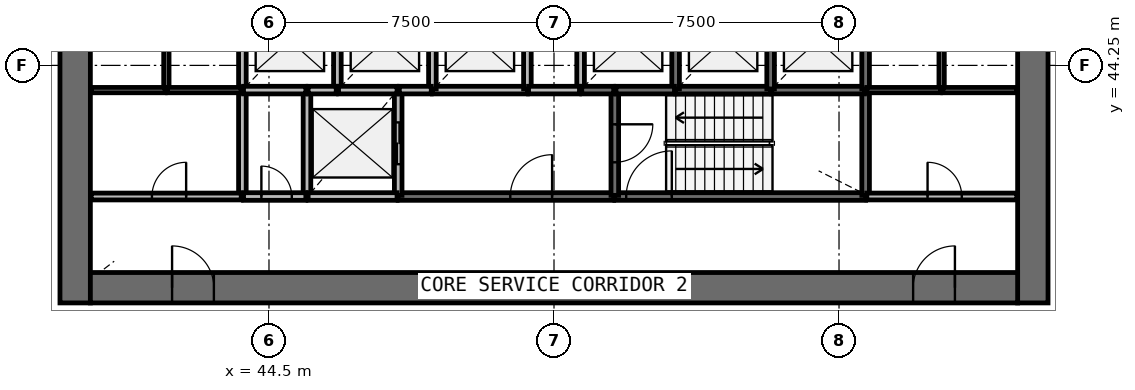
"""IFC4 building model, lengths in metres.
Left out: names, types, materials, properties, quantities, classifications, styles, units other than length and angle.
Written with IfcOpenShell. Run it as: python <this file> out.ifc"""

import sys

from ifc_helpers import new_model, si_unit, direction, frame, frame_2d, origin, place, context, subcontext, project, spatial, rectangle, extrude, source, transform, mapped, element, fill, save


model = new_model("IFC4")
c1 = context("Model", 3, precision=1e-05, world=origin(), true_north=direction((0.0, 1.0)))
c2 = subcontext(c1, "Body", "Model", "MODEL_VIEW")
j1 = project(units=[si_unit("LENGTHUNIT", "METRE"), si_unit("PLANEANGLEUNIT", "RADIAN")], contexts=[c1])
p1 = place(None, origin())
s1 = spatial("IfcSite", under=j1, at=p1, CompositionType="ELEMENT")
p2 = place(p1, origin())
s2 = spatial("IfcBuilding", under=s1, at=p2, CompositionType="ELEMENT")
p3 = place(p2, frame((0.0, 0.0, 133.1)))
s3 = spatial("IfcBuildingStorey", under=s2, at=p3, CompositionType="ELEMENT", Elevation=133.1)
p4 = place(p3, frame((64.6, 38.0, 0.0), z_axis=(0.0, 0.0, 1.0), x_axis=(0.0, 1.0, 0.0)))
e1 = element("IfcWall", 1, at=p4, inside=s3, PredefinedType="SHEAR", context=c2, shape_type="SweptSolid", body=[
    extrude(rectangle(XDim=20.0, YDim=0.8, at=frame_2d((10.0, 0.0))), origin(), (0.0, 0.0, 1.0), 3.9),
])
p5 = place(p4, frame((9.1, 0.0, 0.0)))
e2 = element("IfcOpeningElement", 2, at=p5, cuts=e1, PredefinedType="OPENING", context=c2, shape_type="SweptSolid", body=[
    extrude(rectangle(XDim=1.8, YDim=2.1, at=frame_2d((0.9, 1.05))), frame((0.0, 0.41, 0.0), z_axis=(0.0, -1.0, 0.0), x_axis=(1.0, 0.0, 0.0)), (0.0, 0.0, 1.0), 0.82),
])
p6 = place(p3, frame((39.4, 58.0, 0.0), z_axis=(0.0, 0.0, 1.0), x_axis=(0.0, -1.0, 0.0)))
e3 = element("IfcWall", 3, at=p6, inside=s3, PredefinedType="SHEAR", context=c2, shape_type="SweptSolid", body=[
    extrude(rectangle(XDim=20.0, YDim=0.8, at=frame_2d((10.0, 0.0))), origin(), (0.0, 0.0, 1.0), 3.9),
])
p7 = place(p6, frame((9.1, 0.0, 0.0)))
e4 = element("IfcOpeningElement", 4, at=p7, cuts=e3, PredefinedType="OPENING", context=c2, shape_type="SweptSolid", body=[
    extrude(rectangle(XDim=1.8, YDim=2.1, at=frame_2d((0.9, 1.05))), frame((0.0, 0.41, 0.0), z_axis=(0.0, -1.0, 0.0), x_axis=(1.0, 0.0, 0.0)), (0.0, 0.0, 1.0), 0.82),
])
p8 = place(p3, frame((39.8, 38.4, 0.0), z_axis=(0.0, 0.0, 1.0), x_axis=(1.0, 0.0, 0.0)))
e5 = element("IfcWall", 5, at=p8, inside=s3, PredefinedType="SHEAR", context=c2, shape_type="SweptSolid", body=[
    extrude(rectangle(XDim=24.4, YDim=0.8, at=frame_2d((12.2, 0.0))), origin(), (0.0, 0.0, 1.0), 3.9),
])
p9 = place(p8, frame((21.65, 0.0, 0.0)))
e6 = element("IfcOpeningElement", 6, at=p9, cuts=e5, PredefinedType="OPENING", context=c2, shape_type="SweptSolid", body=[
    extrude(rectangle(XDim=1.1, YDim=2.1, at=frame_2d((0.55, 1.05))), frame((0.0, 0.41, 0.0), z_axis=(0.0, -1.0, 0.0), x_axis=(1.0, 0.0, 0.0)), (0.0, 0.0, 1.0), 0.82),
])
p10 = place(p8, frame((2.15, 0.0, 0.0)))
e7 = element("IfcOpeningElement", 7, at=p10, cuts=e5, PredefinedType="OPENING", context=c2, shape_type="SweptSolid", body=[
    extrude(rectangle(XDim=1.1, YDim=2.1, at=frame_2d((0.55, 1.05))), frame((0.0, 0.41, 0.0), z_axis=(0.0, -1.0, 0.0), x_axis=(1.0, 0.0, 0.0)), (0.0, 0.0, 1.0), 0.82),
])
p11 = place(p3, frame((53.6, 40.8, 0.0), z_axis=(0.0, 0.0, 1.0), x_axis=(1.0, 0.0, 0.0)))
e8 = element("IfcWall", 8, at=p11, inside=s3, PredefinedType="SOLIDWALL", context=c2, shape_type="SweptSolid", body=[
    extrude(rectangle(XDim=6.6, YDim=0.2, at=frame_2d((3.3, 0.0))), origin(), (0.0, 0.0, 1.0), 3.58),
])
p12 = place(p11, frame((0.3, 0.0, 0.0)))
e9 = element("IfcOpeningElement", 9, at=p12, cuts=e8, PredefinedType="OPENING", context=c2, shape_type="SweptSolid", body=[
    extrude(rectangle(XDim=1.2, YDim=2.1, at=frame_2d((0.6, 1.05))), frame((0.0, 0.11, 0.0), z_axis=(0.0, -1.0, 0.0), x_axis=(1.0, 0.0, 0.0)), (0.0, 0.0, 1.0), 0.22),
])
p13 = place(p3, frame((47.9, 40.8, 0.0), z_axis=(0.0, 0.0, 1.0), x_axis=(1.0, 0.0, 0.0)))
e10 = element("IfcWall", 10, at=p13, inside=s3, PredefinedType="SOLIDWALL", context=c2, shape_type="SweptSolid", body=[
    extrude(rectangle(XDim=5.67, YDim=0.2, at=frame_2d((2.835, 0.0))), origin(), (0.0, 0.0, 1.0), 3.58),
])
p14 = place(p13, frame((2.95, 0.0, 0.0)))
e11 = element("IfcOpeningElement", 11, at=p14, cuts=e10, PredefinedType="OPENING", context=c2, shape_type="SweptSolid", body=[
    extrude(rectangle(XDim=1.1, YDim=2.1, at=frame_2d((0.55, 1.05))), frame((0.0, 0.11, 0.0), z_axis=(0.0, -1.0, 0.0), x_axis=(1.0, 0.0, 0.0)), (0.0, 0.0, 1.0), 0.22),
])
for number, where, z_axis, x_axis in (
    (12, (43.8, 43.6, 0.0), (0.0, 0.0, 1.0), (0.0, -1.0, 0.0)),
    (13, (45.5, 43.6, 0.0), (0.0, 0.0, 1.0), (0.0, -1.0, 0.0)),
):
    element("IfcWall", number, at=place(p3, frame(where, z_axis=z_axis, x_axis=x_axis)), inside=s3, PredefinedType="SOLIDWALL", context=c2, shape_type="SweptSolid", body=[
        extrude(rectangle(XDim=2.8, YDim=0.2, at=frame_2d((1.4, 0.0))), origin(), (0.0, 0.0, 1.0), 3.58),
    ])
p15 = place(p3, frame((47.9, 40.83, 0.0), z_axis=(0.0, 0.0, 1.0), x_axis=(0.0, 1.0, 0.0)))
e14 = element("IfcWall", 14, at=p15, inside=s3, PredefinedType="SOLIDWALL", context=c2, shape_type="SweptSolid", body=[
    extrude(rectangle(XDim=2.77, YDim=0.2, at=frame_2d((1.385, 0.0))), origin(), (0.0, 0.0, 1.0), 3.58),
])
p16 = place(p15, frame((0.82, 0.0, 0.0)))
e15 = element("IfcOpeningElement", 15, at=p16, cuts=e14, PredefinedType="OPENING", context=c2, shape_type="SweptSolid", body=[
    extrude(rectangle(XDim=1.1, YDim=2.1, at=frame_2d((0.55, 1.05))), frame((0.0, 0.11, 0.0), z_axis=(0.0, -1.0, 0.0), x_axis=(1.0, 0.0, 0.0)), (0.0, 0.0, 1.0), 0.22),
])
p17 = place(p3, frame((60.2, 40.83, 0.0), z_axis=(0.0, 0.0, 1.0), x_axis=(0.0, 1.0, 0.0)))
e16 = element("IfcWall", 16, at=p17, inside=s3, PredefinedType="SOLIDWALL", context=c2, shape_type="SweptSolid", body=[
    extrude(rectangle(XDim=2.77, YDim=0.2, at=frame_2d((1.385, 0.0))), origin(), (0.0, 0.0, 1.0), 3.58),
])
p18 = place(p3, frame((53.6, 43.6, 0.0), z_axis=(0.0, 0.0, 1.0), x_axis=(0.0, -1.0, 0.0)))
e17 = element("IfcWall", 17, at=p18, inside=s3, PredefinedType="SOLIDWALL", context=c2, shape_type="SweptSolid", body=[
    extrude(rectangle(XDim=2.77, YDim=0.2, at=frame_2d((1.385, 0.0))), origin(), (0.0, 0.0, 1.0), 3.58),
])
p19 = place(p18, frame((0.9, 0.0, 0.0)))
e18 = element("IfcOpeningElement", 18, at=p19, cuts=e17, PredefinedType="OPENING", context=c2, shape_type="SweptSolid", body=[
    extrude(rectangle(XDim=1.0, YDim=2.1, at=frame_2d((0.5, 1.05))), frame((0.0, 0.11, 0.0), z_axis=(0.0, -1.0, 0.0), x_axis=(1.0, 0.0, 0.0)), (0.0, 0.0, 1.0), 0.22),
])
for number, where, z_axis, x_axis in (
    (19, (48.8, 43.6, 0.0), (0.0, 0.0, 1.0), (1.0, 0.0, 0.0)),
    (20, (55.2, 43.6, 0.0), (0.0, 0.0, 1.0), (1.0, 0.0, 0.0)),
):
    element("IfcWall", number, at=place(p3, frame(where, z_axis=z_axis, x_axis=x_axis)), inside=s3, PredefinedType="SOLIDWALL", context=c2, shape_type="SweptSolid", body=[
        extrude(rectangle(XDim=2.5, YDim=0.2, at=frame_2d((1.25, 0.0))), origin(), (0.0, 0.0, 1.0), 3.58),
    ])
p20 = place(p3, frame((57.73, 43.6, 0.0), z_axis=(0.0, 0.0, 1.0), x_axis=(1.0, 0.0, 0.0)))
e21 = element("IfcWall", 21, at=p20, inside=s3, PredefinedType="SOLIDWALL", context=c2, shape_type="SweptSolid", body=[
    extrude(rectangle(XDim=2.44, YDim=0.2, at=frame_2d((1.22, 0.0))), origin(), (0.0, 0.0, 1.0), 3.58),
])
p21 = place(p3, frame((45.53, 40.8, 0.0), z_axis=(0.0, 0.0, 1.0), x_axis=(1.0, 0.0, 0.0)))
e22 = element("IfcWall", 22, at=p21, inside=s3, PredefinedType="SOLIDWALL", context=c2, shape_type="SweptSolid", body=[
    extrude(rectangle(XDim=2.34, YDim=0.2, at=frame_2d((1.17, 0.0))), origin(), (0.0, 0.0, 1.0), 3.58),
])
p22 = place(p3, frame((43.8, 45.99, 0.0), z_axis=(0.0, 0.0, 1.0), x_axis=(0.0, -1.0, 0.0)))
e23 = element("IfcWall", 23, at=p22, inside=s3, PredefinedType="SOLIDWALL", context=c2, shape_type="SweptSolid", body=[
    extrude(rectangle(XDim=2.36, YDim=0.2, at=frame_2d((1.18, 0.0))), origin(), (0.0, 0.0, 1.0), 3.58),
])
p23 = place(p3, frame((46.3, 43.6, 0.0), z_axis=(0.0, 0.0, 1.0), x_axis=(0.0, 1.0, 0.0)))
e24 = element("IfcWall", 24, at=p23, inside=s3, PredefinedType="SOLIDWALL", context=c2, shape_type="SweptSolid", body=[
    extrude(rectangle(XDim=2.39, YDim=0.2, at=frame_2d((1.195, 0.0))), origin(), (0.0, 0.0, 1.0), 3.58),
])
for number, where, z_axis, x_axis in (
    (25, (48.8, 43.63, 0.0), (0.0, 0.0, 1.0), (0.0, 1.0, 0.0)),
    (26, (51.3, 43.63, 0.0), (0.0, 0.0, 1.0), (0.0, 1.0, 0.0)),
):
    element("IfcWall", number, at=place(p3, frame(where, z_axis=z_axis, x_axis=x_axis)), inside=s3, PredefinedType="SOLIDWALL", context=c2, shape_type="SweptSolid", body=[
        extrude(rectangle(XDim=2.36, YDim=0.2, at=frame_2d((1.18, 0.0))), origin(), (0.0, 0.0, 1.0), 3.58),
    ])
p24 = place(p3, frame((52.7, 45.99, 0.0), z_axis=(0.0, 0.0, 1.0), x_axis=(0.0, -1.0, 0.0)))
e27 = element("IfcWall", 27, at=p24, inside=s3, PredefinedType="SOLIDWALL", context=c2, shape_type="SweptSolid", body=[
    extrude(rectangle(XDim=2.39, YDim=0.2, at=frame_2d((1.195, 0.0))), origin(), (0.0, 0.0, 1.0), 3.58),
])
for number, where, z_axis, x_axis in (
    (28, (55.2, 43.63, 0.0), (0.0, 0.0, 1.0), (0.0, 1.0, 0.0)),
    (29, (57.7, 43.63, 0.0), (0.0, 0.0, 1.0), (0.0, 1.0, 0.0)),
    (30, (60.2, 43.63, 0.0), (0.0, 0.0, 1.0), (0.0, 1.0, 0.0)),
):
    element("IfcWall", number, at=place(p3, frame(where, z_axis=z_axis, x_axis=x_axis)), inside=s3, PredefinedType="SOLIDWALL", context=c2, shape_type="SweptSolid", body=[
        extrude(rectangle(XDim=2.36, YDim=0.2, at=frame_2d((1.18, 0.0))), origin(), (0.0, 0.0, 1.0), 3.58),
    ])
p25 = place(p3, frame((43.83, 43.6, 0.0), z_axis=(0.0, 0.0, 1.0), x_axis=(1.0, 0.0, 0.0)))
e31 = element("IfcWall", 31, at=p25, inside=s3, PredefinedType="SOLIDWALL", context=c2, shape_type="SweptSolid", body=[
    extrude(rectangle(XDim=1.64, YDim=0.2, at=frame_2d((0.82, 0.0))), origin(), (0.0, 0.0, 1.0), 3.58),
])
p26 = place(p3, frame((43.83, 40.8, 0.0), z_axis=(0.0, 0.0, 1.0), x_axis=(1.0, 0.0, 0.0)))
e32 = element("IfcWall", 32, at=p26, inside=s3, PredefinedType="SOLIDWALL", context=c2, shape_type="SweptSolid", body=[
    extrude(rectangle(XDim=1.64, YDim=0.2, at=frame_2d((0.82, 0.0))), origin(), (0.0, 0.0, 1.0), 3.58),
])
p27 = place(p26, frame((0.47, 0.0, 0.0)))
e33 = element("IfcOpeningElement", 33, at=p27, cuts=e32, PredefinedType="OPENING", context=c2, shape_type="SweptSolid", body=[
    extrude(rectangle(XDim=0.8, YDim=2.1, at=frame_2d((0.4, 1.05))), frame((0.0, 0.11, 0.0), z_axis=(0.0, -1.0, 0.0), x_axis=(1.0, 0.0, 0.0)), (0.0, 0.0, 1.0), 0.22),
])
for number, where, z_axis, x_axis in (
    (34, (46.33, 43.6, 0.0), (0.0, 0.0, 1.0), (1.0, 0.0, 0.0)),
    (35, (53.63, 43.6, 0.0), (0.0, 0.0, 1.0), (1.0, 0.0, 0.0)),
):
    element("IfcWall", number, at=place(p3, frame(where, z_axis=z_axis, x_axis=x_axis)), inside=s3, PredefinedType="SOLIDWALL", context=c2, shape_type="SweptSolid", body=[
        extrude(rectangle(XDim=1.54, YDim=0.2, at=frame_2d((0.77, 0.0))), origin(), (0.0, 0.0, 1.0), 3.58),
    ])
p28 = place(p3, frame((52.67, 43.6, 0.0), z_axis=(0.0, 0.0, 1.0), x_axis=(-1.0, 0.0, 0.0)))
e36 = element("IfcWall", 36, at=p28, inside=s3, PredefinedType="SOLIDWALL", context=c2, shape_type="SweptSolid", body=[
    extrude(rectangle(XDim=1.34, YDim=0.2, at=frame_2d((0.67, 0.0))), origin(), (0.0, 0.0, 1.0), 3.58),
])
for number, where, z_axis, x_axis in (
    (37, (47.93, 43.6, 0.0), (0.0, 0.0, 1.0), (1.0, 0.0, 0.0)),
    (38, (52.73, 43.6, 0.0), (0.0, 0.0, 1.0), (1.0, 0.0, 0.0)),
):
    element("IfcWall", number, at=place(p3, frame(where, z_axis=z_axis, x_axis=x_axis)), inside=s3, PredefinedType="SOLIDWALL", context=c2, shape_type="SweptSolid", body=[
        extrude(rectangle(XDim=0.84, YDim=0.2, at=frame_2d((0.42, 0.0))), origin(), (0.0, 0.0, 1.0), 3.58),
    ])
p29 = place(p3, frame((45.53, 43.6, 0.0), z_axis=(0.0, 0.0, 1.0), x_axis=(1.0, 0.0, 0.0)))
e39 = element("IfcWall", 39, at=p29, inside=s3, PredefinedType="SOLIDWALL", context=c2, shape_type="SweptSolid", body=[
    extrude(rectangle(XDim=0.74, YDim=0.2, at=frame_2d((0.37, 0.0))), origin(), (0.0, 0.0, 1.0), 3.58),
])
p30 = place(p3, frame((60.23, 40.8, 0.0), z_axis=(0.0, 0.0, 1.0), x_axis=(1.0, 0.0, 0.0)))
e40 = element("IfcWall", 40, at=p30, inside=s3, PredefinedType="PARTITIONING", context=c2, shape_type="SweptSolid", body=[
    extrude(rectangle(XDim=3.95, YDim=0.18, at=frame_2d((1.975, 0.0))), origin(), (0.0, 0.0, 1.0), 3.58),
])
p31 = place(p30, frame((1.6, 0.0, 0.0)))
e41 = element("IfcOpeningElement", 41, at=p31, cuts=e40, PredefinedType="OPENING", context=c2, shape_type="SweptSolid", body=[
    extrude(rectangle(XDim=0.9, YDim=2.1, at=frame_2d((0.45, 1.05))), frame((0.0, 0.1, 0.0), z_axis=(0.0, -1.0, 0.0), x_axis=(1.0, 0.0, 0.0)), (0.0, 0.0, 1.0), 0.2),
])
p32 = place(p3, frame((39.82, 40.8, 0.0), z_axis=(0.0, 0.0, 1.0), x_axis=(1.0, 0.0, 0.0)))
e42 = element("IfcWall", 42, at=p32, inside=s3, PredefinedType="PARTITIONING", context=c2, shape_type="SweptSolid", body=[
    extrude(rectangle(XDim=3.95, YDim=0.18, at=frame_2d((1.975, 0.0))), origin(), (0.0, 0.0, 1.0), 3.58),
])
p33 = place(p32, frame((1.6, 0.0, 0.0)))
e43 = element("IfcOpeningElement", 43, at=p33, cuts=e42, PredefinedType="OPENING", context=c2, shape_type="SweptSolid", body=[
    extrude(rectangle(XDim=0.9, YDim=2.1, at=frame_2d((0.45, 1.05))), frame((0.0, 0.1, 0.0), z_axis=(0.0, -1.0, 0.0), x_axis=(1.0, 0.0, 0.0)), (0.0, 0.0, 1.0), 0.2),
])
for number, where, z_axis, x_axis in (
    (44, (41.8, 43.6, 0.0), (0.0, 0.0, 1.0), (0.0, 1.0, 0.0)),
    (45, (62.2, 43.6, 0.0), (0.0, 0.0, 1.0), (0.0, 1.0, 0.0)),
):
    element("IfcWall", number, at=place(p3, frame(where, z_axis=z_axis, x_axis=x_axis)), inside=s3, PredefinedType="PARTITIONING", context=c2, shape_type="SweptSolid", body=[
        extrude(rectangle(XDim=2.39, YDim=0.14, at=frame_2d((1.195, 0.0))), origin(), (0.0, 0.0, 1.0), 2.88),
    ])
for number, where, z_axis, x_axis in (
    (46, (43.77, 43.6, 0.0), (0.0, 0.0, 1.0), (-1.0, 0.0, 0.0)),
    (47, (60.23, 43.6, 0.0), (0.0, 0.0, 1.0), (1.0, 0.0, 0.0)),
):
    element("IfcWall", number, at=place(p3, frame(where, z_axis=z_axis, x_axis=x_axis)), inside=s3, PredefinedType="PARTITIONING", context=c2, shape_type="SweptSolid", body=[
        extrude(rectangle(XDim=1.94, YDim=0.14, at=frame_2d((0.97, 0.0))), origin(), (0.0, 0.0, 1.0), 2.88),
    ])
for number, where, z_axis, x_axis in (
    (48, (62.23, 43.6, 0.0), (0.0, 0.0, 1.0), (1.0, 0.0, 0.0)),
    (49, (41.77, 43.6, 0.0), (0.0, 0.0, 1.0), (-1.0, 0.0, 0.0)),
):
    element("IfcWall", number, at=place(p3, frame(where, z_axis=z_axis, x_axis=x_axis)), inside=s3, PredefinedType="PARTITIONING", context=c2, shape_type="SweptSolid", body=[
        extrude(rectangle(XDim=1.95, YDim=0.14, at=frame_2d((0.975, 0.0))), origin(), (0.0, 0.0, 1.0), 2.88),
    ])
m1 = source(origin(), c2, "Body", "SweptSolid", [
    extrude(rectangle(XDim=1.1, YDim=2.1, at=frame_2d((0.55, 1.05))), frame((0.0, 0.025, 0.0), z_axis=(0.0, -1.0, 0.0), x_axis=(1.0, 0.0, 0.0)), (0.0, 0.0, 1.0), 0.05),
])
p34 = place(p16, origin())
e50 = element("IfcDoor", 50, at=p34, inside=s3, OperationType="DOUBLE_DOOR_SLIDING", PredefinedType="USERDEFINED", context=c2, shape_type="MappedRepresentation", body=[
    mapped(m1, transform((0.0, 0.0, 0.0), scale=1.0)),
])
fill(e15, e50)
m2 = source(origin(), c2, "Body", "SweptSolid", [
    extrude(rectangle(XDim=1.2, YDim=2.1, at=frame_2d((0.6, 1.05))), frame((0.0, 0.025, 0.0), z_axis=(0.0, -1.0, 0.0), x_axis=(1.0, 0.0, 0.0)), (0.0, 0.0, 1.0), 0.05),
])
p35 = place(p12, origin())
e51 = element("IfcDoor", 51, at=p35, inside=s3, OperationType="SINGLE_SWING_RIGHT", PredefinedType="DOOR", context=c2, shape_type="MappedRepresentation", body=[
    mapped(m2, transform((0.0, 0.0, 0.0), scale=1.0)),
])
fill(e9, e51)
m3 = source(origin(), c2, "Body", "SweptSolid", [
    extrude(rectangle(XDim=1.0, YDim=2.1, at=frame_2d((0.5, 1.05))), frame((0.0, 0.025, 0.0), z_axis=(0.0, -1.0, 0.0), x_axis=(1.0, 0.0, 0.0)), (0.0, 0.0, 1.0), 0.05),
])
p36 = place(p19, origin())
e52 = element("IfcDoor", 52, at=p36, inside=s3, OperationType="SINGLE_SWING_LEFT", PredefinedType="DOOR", context=c2, shape_type="MappedRepresentation", body=[
    mapped(m3, transform((0.0, 0.0, 0.0), scale=1.0)),
])
fill(e18, e52)
m4 = source(origin(), c2, "Body", "SweptSolid", [
    extrude(rectangle(XDim=1.1, YDim=2.1, at=frame_2d((0.55, 1.05))), frame((0.0, 0.025, 0.0), z_axis=(0.0, -1.0, 0.0), x_axis=(1.0, 0.0, 0.0)), (0.0, 0.0, 1.0), 0.05),
])
p37 = place(p14, origin())
e53 = element("IfcDoor", 53, at=p37, inside=s3, OperationType="SINGLE_SWING_RIGHT", PredefinedType="DOOR", context=c2, shape_type="MappedRepresentation", body=[
    mapped(m4, transform((0.0, 0.0, 0.0), scale=1.0)),
])
fill(e11, e53)
m5 = source(origin(), c2, "Body", "SweptSolid", [
    extrude(rectangle(XDim=0.8, YDim=2.1, at=frame_2d((0.4, 1.05))), frame((0.0, 0.025, 0.0), z_axis=(0.0, -1.0, 0.0), x_axis=(1.0, 0.0, 0.0)), (0.0, 0.0, 1.0), 0.05),
])
p38 = place(p27, origin())
e54 = element("IfcDoor", 54, at=p38, inside=s3, OperationType="SINGLE_SWING_LEFT", PredefinedType="DOOR", context=c2, shape_type="MappedRepresentation", body=[
    mapped(m5, transform((0.0, 0.0, 0.0), scale=1.0)),
])
fill(e33, e54)
m6 = source(origin(), c2, "Body", "SweptSolid", [
    extrude(rectangle(XDim=1.1, YDim=2.1, at=frame_2d((0.55, 1.05))), frame((0.0, 0.025, 0.0), z_axis=(0.0, -1.0, 0.0), x_axis=(1.0, 0.0, 0.0)), (0.0, 0.0, 1.0), 0.05),
])
p39 = place(p9, origin())
e55 = element("IfcDoor", 55, at=p39, inside=s3, OperationType="SINGLE_SWING_RIGHT", PredefinedType="DOOR", context=c2, shape_type="MappedRepresentation", body=[
    mapped(m6, transform((0.0, 0.0, 0.0), scale=1.0)),
])
fill(e6, e55)
p40 = place(p10, origin())
e56 = element("IfcDoor", 56, at=p40, inside=s3, OperationType="SINGLE_SWING_LEFT", PredefinedType="DOOR", context=c2, shape_type="MappedRepresentation", body=[
    mapped(m6, transform((0.0, 0.0, 0.0), scale=1.0)),
])
fill(e7, e56)
m7 = source(origin(), c2, "Body", "SweptSolid", [
    extrude(rectangle(XDim=0.9, YDim=2.1, at=frame_2d((0.45, 1.05))), frame((0.0, 0.025, 0.0), z_axis=(0.0, -1.0, 0.0), x_axis=(1.0, 0.0, 0.0)), (0.0, 0.0, 1.0), 0.05),
])
p41 = place(p33, origin())
e57 = element("IfcDoor", 57, at=p41, inside=s3, OperationType="SINGLE_SWING_RIGHT", PredefinedType="DOOR", context=c2, shape_type="MappedRepresentation", body=[
    mapped(m7, transform((0.0, 0.0, 0.0), scale=1.0)),
])
fill(e43, e57)
p42 = place(p31, origin())
e58 = element("IfcDoor", 58, at=p42, inside=s3, OperationType="SINGLE_SWING_LEFT", PredefinedType="DOOR", context=c2, shape_type="MappedRepresentation", body=[
    mapped(m7, transform((0.0, 0.0, 0.0), scale=1.0)),
])
fill(e41, e58)
save(model, sys.argv[1])
